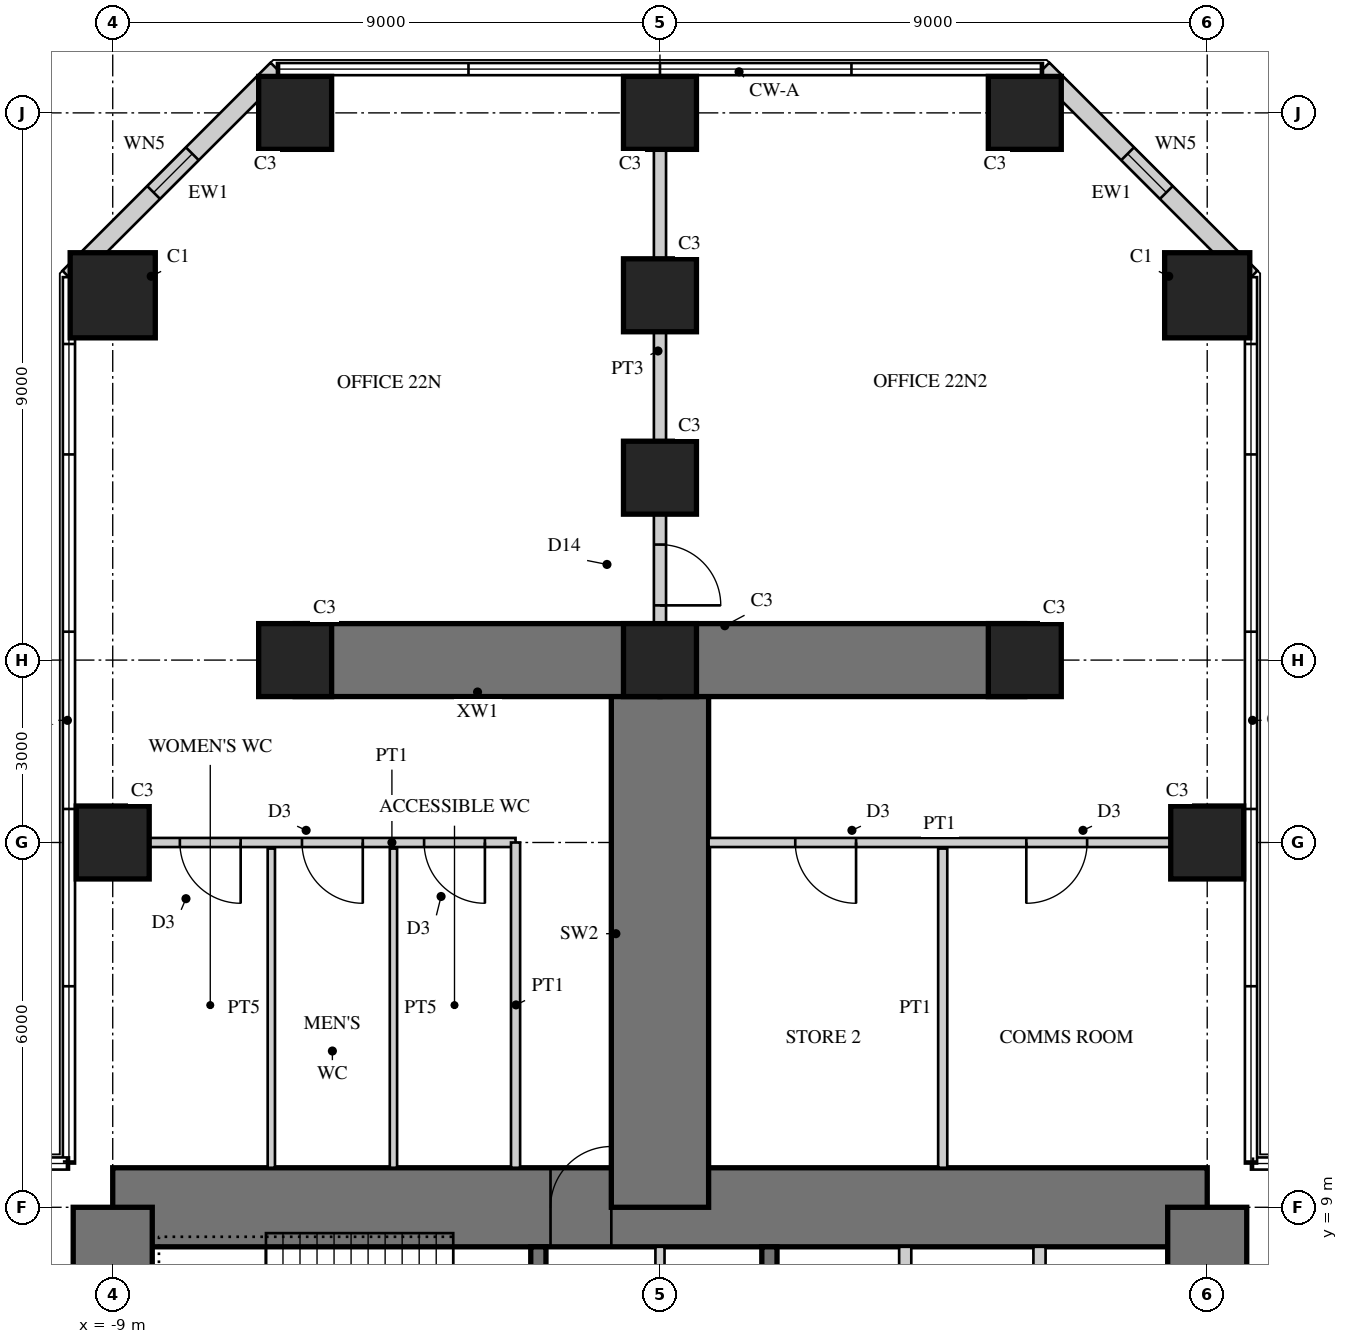
"""IFC4 building model, lengths in metres.
Left out: names, types, materials, properties, quantities, classifications, styles, units other than length and angle.
Written with IfcOpenShell. Run it as: python <this file> out.ifc"""

import sys

from ifc_helpers import new_model, si_unit, direction, frame, frame_2d, origin, origin_2d, place, context, subcontext, project, spatial, rectangle, hollow_rectangle, extrude, element, fill, save


model = new_model("IFC4")
c1 = context("Model", 3, precision=1e-05, world=origin(), true_north=direction((0.0, 1.0)))
c2 = subcontext(c1, "Body", "Model", "MODEL_VIEW")
j1 = project(units=[si_unit("LENGTHUNIT", "METRE"), si_unit("PLANEANGLEUNIT", "RADIAN")], contexts=[c1])
p1 = place(None, origin())
s1 = spatial("IfcSite", under=j1, at=p1, CompositionType="ELEMENT")
p2 = place(p1, origin())
s2 = spatial("IfcBuilding", under=s1, at=p2, CompositionType="ELEMENT")
p3 = place(p2, frame((0.0, 0.0, 91.5)))
s3 = spatial("IfcBuildingStorey", under=s2, at=p3, CompositionType="ELEMENT", Elevation=91.5)
p4 = place(p3, frame((9.0, 9.0, 0.0), z_axis=(0.0, 0.0, 1.0), x_axis=(-1.0, 0.0, 0.0)))
e1 = element("IfcWall", 1, at=p4, inside=s3, PredefinedType="SHEAR", context=c2, shape_type="SweptSolid", body=[
    extrude(rectangle(XDim=18.0, YDim=1.3, at=frame_2d((9.0, 0.0))), origin(), (0.0, 0.0, 1.0), 4.0),
])
p5 = place(p4, frame((9.8, 0.0, 0.0)))
e2 = element("IfcOpeningElement", 2, at=p5, cuts=e1, PredefinedType="OPENING", context=c2, shape_type="SweptSolid", body=[
    extrude(rectangle(XDim=1.0, YDim=2.4, at=frame_2d((0.5, 1.2))), frame((0.0, 0.66, 0.0), z_axis=(0.0, -1.0, 0.0), x_axis=(1.0, 0.0, 0.0)), (0.0, 0.0, 1.0), 1.32),
])
p6 = place(p3, frame((9.0, -9.0, 0.0), z_axis=(0.0, 0.0, 1.0), x_axis=(0.0, 1.0, 0.0)))
e3 = element("IfcWall", 3, at=p6, inside=s3, PredefinedType="SHEAR", context=c2, shape_type="SweptSolid", body=[
    extrude(rectangle(XDim=18.0, YDim=1.3, at=frame_2d((9.0, 0.0))), origin(), (0.0, 0.0, 1.0), 4.0),
])
p7 = place(p6, frame((9.8, 0.0, 0.0)))
e4 = element("IfcOpeningElement", 4, at=p7, cuts=e3, PredefinedType="OPENING", context=c2, shape_type="SweptSolid", body=[
    extrude(rectangle(XDim=1.0, YDim=2.4, at=frame_2d((0.5, 1.2))), frame((0.0, 0.66, 0.0), z_axis=(0.0, -1.0, 0.0), x_axis=(1.0, 0.0, 0.0)), (0.0, 0.0, 1.0), 1.32),
])
p8 = place(p3, frame((-9.0, 9.0, 0.0), z_axis=(0.0, 0.0, 1.0), x_axis=(0.0, -1.0, 0.0)))
e5 = element("IfcWall", 5, at=p8, inside=s3, PredefinedType="SHEAR", context=c2, shape_type="SweptSolid", body=[
    extrude(rectangle(XDim=18.0, YDim=1.3, at=frame_2d((9.0, 0.0))), origin(), (0.0, 0.0, 1.0), 4.0),
])
p9 = place(p8, frame((9.8, 0.0, 0.0)))
e6 = element("IfcOpeningElement", 6, at=p9, cuts=e5, PredefinedType="OPENING", context=c2, shape_type="SweptSolid", body=[
    extrude(rectangle(XDim=1.0, YDim=2.4, at=frame_2d((0.5, 1.2))), frame((0.0, 0.66, 0.0), z_axis=(0.0, -1.0, 0.0), x_axis=(1.0, 0.0, 0.0)), (0.0, 0.0, 1.0), 1.32),
])
p10 = place(p3, frame((1.8, 1.875, 0.0), z_axis=(0.0, 0.0, 1.0), x_axis=(0.0, 1.0, 0.0)))
e7 = element("IfcWall", 7, at=p10, inside=s3, PredefinedType="SHEAR", context=c2, shape_type="SweptSolid", body=[
    extrude(rectangle(XDim=6.475, YDim=0.25, at=frame_2d((3.238, 0.0))), origin(), (0.0, 0.0, 1.0), 4.0),
])
p11 = place(p10, frame((1.875, 0.0, 0.0)))
e8 = element("IfcOpeningElement", 8, at=p11, cuts=e7, PredefinedType="OPENING", context=c2, shape_type="SweptSolid", body=[
    extrude(rectangle(XDim=1.6, YDim=2.4, at=frame_2d((0.8, 1.2))), frame((0.0, 0.135, 0.0), z_axis=(0.0, -1.0, 0.0), x_axis=(1.0, 0.0, 0.0)), (0.0, 0.0, 1.0), 0.27),
])
for number, where, z_axis, x_axis in (
    (9, (4.033, 5.975, 0.0), (0.0, 0.0, 1.0), (0.0, 1.0, 0.0)),
    (10, (6.242, 5.975, 0.0), (0.0, 0.0, 1.0), (0.0, 1.0, 0.0)),
):
    element("IfcWall", number, at=place(p3, frame(where, z_axis=z_axis, x_axis=x_axis)), inside=s3, PredefinedType="PARTITIONING", context=c2, shape_type="SweptSolid", body=[
        extrude(rectangle(XDim=2.375, YDim=0.2, at=frame_2d((1.188, 0.0))), origin(), (0.0, 0.0, 1.0), 4.0),
    ])
p12 = place(p3, frame((-2.0, 1.675, 0.0), z_axis=(0.0, 0.0, 1.0), x_axis=(0.0, 1.0, 0.0)))
e11 = element("IfcWall", 11, at=p12, inside=s3, PredefinedType="SHEAR", context=c2, shape_type="SweptSolid", body=[
    extrude(rectangle(XDim=6.675, YDim=0.25, at=frame_2d((3.337, 0.0))), origin(), (0.0, 0.0, 1.0), 4.0),
])
p13 = place(p12, frame((0.725, 0.0, 0.0)))
e12 = element("IfcOpeningElement", 12, at=p13, cuts=e11, PredefinedType="OPENING", context=c2, shape_type="SweptSolid", body=[
    extrude(rectangle(XDim=1.0, YDim=2.1, at=frame_2d((0.5, 1.05))), frame((0.0, 0.135, 0.0), z_axis=(0.0, -1.0, 0.0), x_axis=(1.0, 0.0, 0.0)), (0.0, 0.0, 1.0), 0.27),
])
p14 = place(p3, frame((0.0, 9.0, 0.0), z_axis=(0.0, 0.0, 1.0), x_axis=(0.0, 1.0, 0.0)))
e13 = element("IfcWall", 13, at=p14, inside=s3, PredefinedType="SHEAR", context=c2, shape_type="SweptSolid", body=[
    extrude(rectangle(XDim=9.0, YDim=1.6, at=frame_2d((4.5, 0.0))), origin(), (0.0, 0.0, 1.0), 4.0),
])
for number, where, z_axis, x_axis in (
    (14, (0.0, 18.0, 0.0), (0.0, 0.0, 1.0), (-1.0, 0.0, 0.0)),
    (15, (0.0, 18.0, 0.0), (0.0, 0.0, 1.0), (1.0, 0.0, 0.0)),
):
    element("IfcWall", number, at=place(p3, frame(where, z_axis=z_axis, x_axis=x_axis)), inside=s3, PredefinedType="SHEAR", context=c2, shape_type="SweptSolid", body=[
        extrude(rectangle(XDim=6.0, YDim=1.2, at=frame_2d((3.0, 0.0))), origin(), (0.0, 0.0, 1.0), 4.0),
    ])
p15 = place(p3, frame((9.0, 15.0, 0.0), z_axis=(0.0, 0.0, 1.0), x_axis=(1.0, 0.0, 0.0)))
e16 = element("IfcColumn", 16, at=p15, inside=s3, PredefinedType="COLUMN", context=c2, shape_type="SweptSolid", body=[
    extrude(rectangle(XDim=1.2, YDim=1.2, at=origin_2d()), origin(), (0.0, 0.0, 1.0), 4.0),
])
p16 = place(p3, frame((9.0, 24.0, 0.0), z_axis=(0.0, 0.0, 1.0), x_axis=(1.0, 0.0, 0.0)))
e17 = element("IfcColumn", 17, at=p16, inside=s3, PredefinedType="COLUMN", context=c2, shape_type="SweptSolid", body=[
    extrude(rectangle(XDim=1.4, YDim=1.4, at=origin_2d()), origin(), (0.0, 0.0, 1.0), 4.0),
])
p17 = place(p3, frame((-9.0, 15.0, 0.0), z_axis=(0.0, 0.0, 1.0), x_axis=(1.0, 0.0, 0.0)))
e18 = element("IfcColumn", 18, at=p17, inside=s3, PredefinedType="COLUMN", context=c2, shape_type="SweptSolid", body=[
    extrude(rectangle(XDim=1.2, YDim=1.2, at=origin_2d()), origin(), (0.0, 0.0, 1.0), 4.0),
])
p18 = place(p3, frame((-9.0, 24.0, 0.0), z_axis=(0.0, 0.0, 1.0), x_axis=(1.0, 0.0, 0.0)))
e19 = element("IfcColumn", 19, at=p18, inside=s3, PredefinedType="COLUMN", context=c2, shape_type="SweptSolid", body=[
    extrude(rectangle(XDim=1.4, YDim=1.4, at=origin_2d()), origin(), (0.0, 0.0, 1.0), 4.0),
])
for number, where, z_axis, x_axis in (
    (20, (6.0, 27.0, 0.0), (0.0, 0.0, 1.0), (1.0, 0.0, 0.0)),
    (21, (0.0, 27.0, 0.0), (0.0, 0.0, 1.0), (1.0, 0.0, 0.0)),
    (22, (-6.0, 27.0, 0.0), (0.0, 0.0, 1.0), (1.0, 0.0, 0.0)),
    (23, (6.0, 18.0, 0.0), (0.0, 0.0, 1.0), (1.0, 0.0, 0.0)),
    (24, (0.0, 18.0, 0.0), (0.0, 0.0, 1.0), (1.0, 0.0, 0.0)),
    (25, (-6.0, 18.0, 0.0), (0.0, 0.0, 1.0), (1.0, 0.0, 0.0)),
    (26, (0.0, 21.0, 0.0), (0.0, 0.0, 1.0), (1.0, 0.0, 0.0)),
    (27, (0.0, 24.0, 0.0), (0.0, 0.0, 1.0), (1.0, 0.0, 0.0)),
):
    element("IfcColumn", number, at=place(p3, frame(where, z_axis=z_axis, x_axis=x_axis)), inside=s3, PredefinedType="COLUMN", context=c2, shape_type="SweptSolid", body=[
        extrude(rectangle(XDim=1.2, YDim=1.2, at=origin_2d()), origin(), (0.0, 0.0, 1.0), 4.0),
    ])
p19 = place(p3, frame((9.72, 24.298, 0.0), z_axis=(0.0, 0.0, 1.0), x_axis=(-0.707106781187, 0.707106781187, 0.0)))
e28 = element("IfcWall", 28, at=p19, inside=s3, PredefinedType="SOLIDWALL", context=c2, shape_type="SweptSolid", body=[
    extrude(rectangle(XDim=4.839, YDim=0.3, at=frame_2d((2.419, 0.0))), origin(), (0.0, 0.0, 1.0), 3.75),
])
p20 = place(p19, frame((1.969, 0.0, 0.3)))
e29 = element("IfcOpeningElement", 29, at=p20, cuts=e28, PredefinedType="OPENING", context=c2, shape_type="SweptSolid", body=[
    extrude(rectangle(XDim=0.9, YDim=2.4, at=frame_2d((0.45, 1.2))), frame((0.0, 0.16, 0.0), z_axis=(0.0, -1.0, 0.0), x_axis=(1.0, 0.0, 0.0)), (0.0, 0.0, 1.0), 0.32),
])
p21 = place(p3, frame((-6.298, 27.72, 0.0), z_axis=(0.0, 0.0, 1.0), x_axis=(-0.707106781187, -0.707106781187, 0.0)))
e30 = element("IfcWall", 30, at=p21, inside=s3, PredefinedType="SOLIDWALL", context=c2, shape_type="SweptSolid", body=[
    extrude(rectangle(XDim=4.839, YDim=0.3, at=frame_2d((2.419, 0.0))), origin(), (0.0, 0.0, 1.0), 3.75),
])
p22 = place(p21, frame((1.969, 0.0, 0.3)))
e31 = element("IfcOpeningElement", 31, at=p22, cuts=e30, PredefinedType="OPENING", context=c2, shape_type="SweptSolid", body=[
    extrude(rectangle(XDim=0.9, YDim=2.4, at=frame_2d((0.45, 1.2))), frame((0.0, 0.16, 0.0), z_axis=(0.0, -1.0, 0.0), x_axis=(1.0, 0.0, 0.0)), (0.0, 0.0, 1.0), 0.32),
])
p23 = place(p3, frame((0.0, 5.675, 0.0), z_axis=(0.0, 0.0, 1.0), x_axis=(0.0, 1.0, 0.0)))
e32 = element("IfcWall", 32, at=p23, inside=s3, PredefinedType="PARTITIONING", context=c2, shape_type="SweptSolid", body=[
    extrude(rectangle(XDim=2.675, YDim=0.15, at=frame_2d((1.337, 0.0))), origin(), (0.0, 0.0, 1.0), 3.75),
])
p24 = place(p23, frame((0.4, 0.0, 0.0)))
e33 = element("IfcOpeningElement", 33, at=p24, cuts=e32, PredefinedType="OPENING", context=c2, shape_type="SweptSolid", body=[
    extrude(rectangle(XDim=1.0, YDim=2.1, at=frame_2d((0.5, 1.05))), frame((0.0, 0.085, 0.0), z_axis=(0.0, -1.0, 0.0), x_axis=(1.0, 0.0, 0.0)), (0.0, 0.0, 1.0), 0.17),
])
p25 = place(p3, frame((-2.375, 15.0, 0.0), z_axis=(0.0, 0.0, 1.0), x_axis=(-1.0, 0.0, 0.0)))
e34 = element("IfcWall", 34, at=p25, inside=s3, PredefinedType="PARTITIONING", context=c2, shape_type="SweptSolid", body=[
    extrude(rectangle(XDim=6.025, YDim=0.15, at=frame_2d((3.012, 0.0))), origin(), (0.0, 0.0, 1.0), 2.7),
])
p26 = place(p25, frame((0.504, 0.0, 0.0)))
e35 = element("IfcOpeningElement", 35, at=p26, cuts=e34, PredefinedType="OPENING", context=c2, shape_type="SweptSolid", body=[
    extrude(rectangle(XDim=1.0, YDim=2.1, at=frame_2d((0.5, 1.05))), frame((0.0, 0.085, 0.0), z_axis=(0.0, -1.0, 0.0), x_axis=(1.0, 0.0, 0.0)), (0.0, 0.0, 1.0), 0.17),
])
p27 = place(p25, frame((2.512, 0.0, 0.0)))
e36 = element("IfcOpeningElement", 36, at=p27, cuts=e34, PredefinedType="OPENING", context=c2, shape_type="SweptSolid", body=[
    extrude(rectangle(XDim=1.0, YDim=2.1, at=frame_2d((0.5, 1.05))), frame((0.0, 0.085, 0.0), z_axis=(0.0, -1.0, 0.0), x_axis=(1.0, 0.0, 0.0)), (0.0, 0.0, 1.0), 0.17),
])
p28 = place(p25, frame((4.521, 0.0, 0.0)))
e37 = element("IfcOpeningElement", 37, at=p28, cuts=e34, PredefinedType="OPENING", context=c2, shape_type="SweptSolid", body=[
    extrude(rectangle(XDim=1.0, YDim=2.1, at=frame_2d((0.5, 1.05))), frame((0.0, 0.085, 0.0), z_axis=(0.0, -1.0, 0.0), x_axis=(1.0, 0.0, 0.0)), (0.0, 0.0, 1.0), 0.17),
])
p29 = place(p3, frame((-2.375, 9.65, 0.0), z_axis=(0.0, 0.0, 1.0), x_axis=(0.0, 1.0, 0.0)))
e38 = element("IfcWall", 38, at=p29, inside=s3, PredefinedType="PARTITIONING", context=c2, shape_type="SweptSolid", body=[
    extrude(rectangle(XDim=5.35, YDim=0.15, at=frame_2d((2.675, 0.0))), origin(), (0.0, 0.0, 1.0), 3.75),
])
for number, where, z_axis, x_axis in (
    (39, (-4.383, 9.65, 0.0), (0.0, 0.0, 1.0), (0.0, 1.0, 0.0)),
    (40, (-6.392, 9.65, 0.0), (0.0, 0.0, 1.0), (0.0, 1.0, 0.0)),
):
    element("IfcWall", number, at=place(p3, frame(where, z_axis=z_axis, x_axis=x_axis)), inside=s3, PredefinedType="PLUMBINGWALL", context=c2, shape_type="SweptSolid", body=[
        extrude(rectangle(XDim=5.25, YDim=0.12, at=frame_2d((2.625, 0.0))), origin(), (0.0, 0.0, 1.0), 3.75),
    ])
p30 = place(p3, frame((8.4, 15.0, 0.0), z_axis=(0.0, 0.0, 1.0), x_axis=(-1.0, 0.0, 0.0)))
e41 = element("IfcWall", 41, at=p30, inside=s3, PredefinedType="PARTITIONING", context=c2, shape_type="SweptSolid", body=[
    extrude(rectangle(XDim=7.6, YDim=0.15, at=frame_2d((3.8, 0.0))), origin(), (0.0, 0.0, 1.0), 2.7),
])
p31 = place(p30, frame((1.375, 0.0, 0.0)))
e42 = element("IfcOpeningElement", 42, at=p31, cuts=e41, PredefinedType="OPENING", context=c2, shape_type="SweptSolid", body=[
    extrude(rectangle(XDim=1.0, YDim=2.1, at=frame_2d((0.5, 1.05))), frame((0.0, 0.085, 0.0), z_axis=(0.0, -1.0, 0.0), x_axis=(1.0, 0.0, 0.0)), (0.0, 0.0, 1.0), 0.17),
])
p32 = place(p30, frame((5.175, 0.0, 0.0)))
e43 = element("IfcOpeningElement", 43, at=p32, cuts=e41, PredefinedType="OPENING", context=c2, shape_type="SweptSolid", body=[
    extrude(rectangle(XDim=1.0, YDim=2.1, at=frame_2d((0.5, 1.05))), frame((0.0, 0.085, 0.0), z_axis=(0.0, -1.0, 0.0), x_axis=(1.0, 0.0, 0.0)), (0.0, 0.0, 1.0), 0.17),
])
p33 = place(p3, frame((4.65, 9.65, 0.0), z_axis=(0.0, 0.0, 1.0), x_axis=(0.0, 1.0, 0.0)))
e44 = element("IfcWall", 44, at=p33, inside=s3, PredefinedType="PARTITIONING", context=c2, shape_type="SweptSolid", body=[
    extrude(rectangle(XDim=5.25, YDim=0.15, at=frame_2d((2.625, 0.0))), origin(), (0.0, 0.0, 1.0), 3.75),
])
p34 = place(p3, frame((0.0, 18.0, 0.0), z_axis=(0.0, 0.0, 1.0), x_axis=(0.0, 1.0, 0.0)))
e45 = element("IfcWall", 45, at=p34, inside=s3, PredefinedType="SOLIDWALL", context=c2, shape_type="SweptSolid", body=[
    extrude(rectangle(XDim=3.0, YDim=0.2, at=frame_2d((1.5, 0.0))), origin(), (0.0, 0.0, 1.0), 3.75),
])
p35 = place(p34, frame((0.9, 0.0, 0.0)))
e46 = element("IfcOpeningElement", 46, at=p35, cuts=e45, PredefinedType="OPENING", context=c2, shape_type="SweptSolid", body=[
    extrude(rectangle(XDim=1.0, YDim=2.2, at=frame_2d((0.5, 1.1))), frame((0.0, 0.11, 0.0), z_axis=(0.0, -1.0, 0.0), x_axis=(1.0, 0.0, 0.0)), (0.0, 0.0, 1.0), 0.22),
])
p36 = place(p3, frame((0.0, 21.0, 0.0), z_axis=(0.0, 0.0, 1.0), x_axis=(0.0, 1.0, 0.0)))
e47 = element("IfcWall", 47, at=p36, inside=s3, PredefinedType="SOLIDWALL", context=c2, shape_type="SweptSolid", body=[
    extrude(rectangle(XDim=6.0, YDim=0.2, at=frame_2d((3.0, 0.0))), origin(), (0.0, 0.0, 1.0), 2.65),
])
p37 = place(p20, origin())
e48 = element("IfcWindow", 48, at=p37, inside=s3, PartitioningType="SINGLE_PANEL", PredefinedType="WINDOW", context=c2, shape_type="SweptSolid", body=[
    extrude(hollow_rectangle(XDim=0.9, YDim=2.4, WallThickness=0.06, at=frame_2d((0.45, 1.2))), frame((0.0, 0.03, 0.0), z_axis=(0.0, -1.0, 0.0), x_axis=(1.0, 0.0, 0.0)), (0.0, 0.0, 1.0), 0.06),
    extrude(rectangle(XDim=0.779, YDim=2.279, at=frame_2d((0.45, 1.2))), frame((0.0, 0.03, 0.0), z_axis=(0.0, -1.0, 0.0), x_axis=(1.0, 0.0, 0.0)), (0.0, 0.0, 1.0), 0.06),
])
fill(e29, e48)
p38 = place(p22, origin())
e49 = element("IfcWindow", 49, at=p38, inside=s3, PartitioningType="SINGLE_PANEL", PredefinedType="WINDOW", context=c2, shape_type="SweptSolid", body=[
    extrude(hollow_rectangle(XDim=0.9, YDim=2.4, WallThickness=0.06, at=frame_2d((0.45, 1.2))), frame((0.0, 0.03, 0.0), z_axis=(0.0, -1.0, 0.0), x_axis=(1.0, 0.0, 0.0)), (0.0, 0.0, 1.0), 0.06),
    extrude(rectangle(XDim=0.779, YDim=2.279, at=frame_2d((0.45, 1.2))), frame((0.0, 0.03, 0.0), z_axis=(0.0, -1.0, 0.0), x_axis=(1.0, 0.0, 0.0)), (0.0, 0.0, 1.0), 0.06),
])
fill(e31, e49)
p39 = place(p26, origin())
e50 = element("IfcDoor", 50, at=p39, inside=s3, OperationType="SINGLE_SWING_LEFT", PredefinedType="DOOR", context=c2, shape_type="SweptSolid", body=[
    extrude(rectangle(XDim=1.0, YDim=2.1, at=frame_2d((0.5, 1.05))), frame((0.0, 0.025, 0.0), z_axis=(0.0, -1.0, 0.0), x_axis=(1.0, 0.0, 0.0)), (0.0, 0.0, 1.0), 0.05),
])
fill(e35, e50)
p40 = place(p27, origin())
e51 = element("IfcDoor", 51, at=p40, inside=s3, OperationType="SINGLE_SWING_LEFT", PredefinedType="DOOR", context=c2, shape_type="SweptSolid", body=[
    extrude(rectangle(XDim=1.0, YDim=2.1, at=frame_2d((0.5, 1.05))), frame((0.0, 0.025, 0.0), z_axis=(0.0, -1.0, 0.0), x_axis=(1.0, 0.0, 0.0)), (0.0, 0.0, 1.0), 0.05),
])
fill(e36, e51)
p41 = place(p28, origin())
e52 = element("IfcDoor", 52, at=p41, inside=s3, OperationType="SINGLE_SWING_LEFT", PredefinedType="DOOR", context=c2, shape_type="SweptSolid", body=[
    extrude(rectangle(XDim=1.0, YDim=2.1, at=frame_2d((0.5, 1.05))), frame((0.0, 0.025, 0.0), z_axis=(0.0, -1.0, 0.0), x_axis=(1.0, 0.0, 0.0)), (0.0, 0.0, 1.0), 0.05),
])
fill(e37, e52)
p42 = place(p31, origin())
e53 = element("IfcDoor", 53, at=p42, inside=s3, OperationType="SINGLE_SWING_RIGHT", PredefinedType="DOOR", context=c2, shape_type="SweptSolid", body=[
    extrude(rectangle(XDim=1.0, YDim=2.1, at=frame_2d((0.5, 1.05))), frame((0.0, 0.025, 0.0), z_axis=(0.0, -1.0, 0.0), x_axis=(1.0, 0.0, 0.0)), (0.0, 0.0, 1.0), 0.05),
])
fill(e42, e53)
p43 = place(p32, origin())
e54 = element("IfcDoor", 54, at=p43, inside=s3, OperationType="SINGLE_SWING_LEFT", PredefinedType="DOOR", context=c2, shape_type="SweptSolid", body=[
    extrude(rectangle(XDim=1.0, YDim=2.1, at=frame_2d((0.5, 1.05))), frame((0.0, 0.025, 0.0), z_axis=(0.0, -1.0, 0.0), x_axis=(1.0, 0.0, 0.0)), (0.0, 0.0, 1.0), 0.05),
])
fill(e43, e54)
p44 = place(p35, frame((1.0, 0.0, 0.0), z_axis=(0.0, 0.0, 1.0), x_axis=(-1.0, 0.0, 0.0)))
e55 = element("IfcDoor", 55, at=p44, inside=s3, OperationType="SINGLE_SWING_RIGHT", PredefinedType="DOOR", context=c2, shape_type="SweptSolid", body=[
    extrude(rectangle(XDim=1.0, YDim=2.2, at=frame_2d((0.5, 1.1))), frame((0.0, 0.025, 0.0), z_axis=(0.0, -1.0, 0.0), x_axis=(1.0, 0.0, 0.0)), (0.0, 0.0, 1.0), 0.05),
])
fill(e46, e55)
p45 = place(p5, frame((1.0, 0.0, 0.0), z_axis=(0.0, 0.0, 1.0), x_axis=(-1.0, 0.0, 0.0)))
e56 = element("IfcDoor", 56, at=p45, inside=s3, OperationType="SINGLE_SWING_RIGHT", PredefinedType="DOOR", context=c2, shape_type="SweptSolid", body=[
    extrude(rectangle(XDim=1.0, YDim=2.4, at=frame_2d((0.5, 1.2))), frame((0.0, -0.005, 0.0), z_axis=(0.0, -1.0, 0.0), x_axis=(1.0, 0.0, 0.0)), (0.0, 0.0, 1.0), 0.05),
])
fill(e2, e56)
save(model, sys.argv[1])
